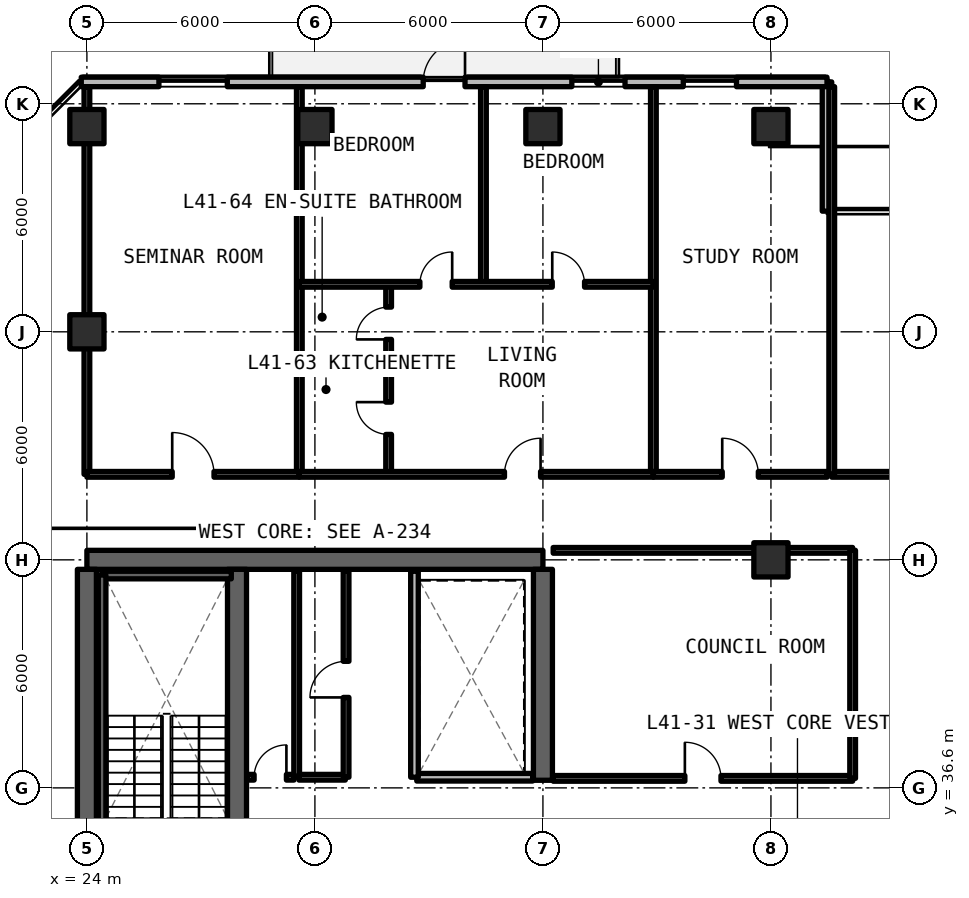
"""IFC4 building model, lengths in metres.
Left out: names, types, materials, properties, quantities, classifications, styles, units other than length and angle.
Written with IfcOpenShell. Run it as: python <this file> out.ifc"""

import sys

from ifc_helpers import new_model, si_unit, direction, frame, frame_2d, origin, origin_2d, place, context, subcontext, project, spatial, rectangle, extrude, element, fill, save


model = new_model("IFC4")
c1 = context("Model", 3, precision=1e-05, world=origin(), true_north=direction((0.0, 1.0)))
c2 = subcontext(c1, "Body", "Model", "MODEL_VIEW")
j1 = project(units=[si_unit("LENGTHUNIT", "METRE"), si_unit("PLANEANGLEUNIT", "RADIAN")], contexts=[c1])
p1 = place(None, origin())
s1 = spatial("IfcSite", under=j1, at=p1, CompositionType="ELEMENT")
p2 = place(p1, origin())
s2 = spatial("IfcBuilding", under=s1, at=p2, CompositionType="ELEMENT")
p3 = place(p2, frame((0.0, 0.0, 148.5)))
s3 = spatial("IfcBuildingStorey", under=s2, at=p3, CompositionType="ELEMENT", Elevation=148.5)
p4 = place(p3, frame((36.0, 42.6, 0.0), z_axis=(0.0, 0.0, 1.0), x_axis=(-1.0, 0.0, 0.0)))
e1 = element("IfcWall", 1, at=p4, inside=s3, PredefinedType="SHEAR", context=c2, shape_type="SweptSolid", body=[
    extrude(rectangle(XDim=12.0, YDim=0.5, at=frame_2d((6.0, 0.0))), origin(), (0.0, 0.0, 1.0), 3.3),
])
p5 = place(p3, frame((24.0, 24.85, 0.0), z_axis=(0.0, 0.0, 1.0), x_axis=(0.0, 1.0, 0.0)))
e2 = element("IfcWall", 2, at=p5, inside=s3, PredefinedType="SHEAR", context=c2, shape_type="SweptSolid", body=[
    extrude(rectangle(XDim=17.5, YDim=0.5, at=frame_2d((8.75, 0.0))), origin(), (0.0, 0.0, 1.0), 3.3),
])
p6 = place(p3, frame((36.0, 36.8, 0.0), z_axis=(0.0, 0.0, 1.0), x_axis=(0.0, 1.0, 0.0)))
e3 = element("IfcWall", 3, at=p6, inside=s3, PredefinedType="SHEAR", context=c2, shape_type="SweptSolid", body=[
    extrude(rectangle(XDim=5.55, YDim=0.5, at=frame_2d((2.775, 0.0))), origin(), (0.0, 0.0, 1.0), 3.3),
])
p7 = place(p3, frame((27.95, 24.85, 0.0), z_axis=(0.0, 0.0, 1.0), x_axis=(0.0, 1.0, 0.0)))
e4 = element("IfcWall", 4, at=p7, inside=s3, PredefinedType="SHEAR", context=c2, shape_type="SweptSolid", body=[
    extrude(rectangle(XDim=17.5, YDim=0.5, at=frame_2d((8.75, 0.0))), origin(), (0.0, 0.0, 1.0), 3.3),
])
p8 = place(p7, frame((0.4, 0.0, 0.0)))
e5 = element("IfcOpeningElement", 5, at=p8, cuts=e4, PredefinedType="OPENING", context=c2, shape_type="SweptSolid", body=[
    extrude(rectangle(XDim=1.15, YDim=2.15, at=frame_2d((0.575, 1.075))), frame((0.0, 0.26, 0.0), z_axis=(0.0, -1.0, 0.0), x_axis=(1.0, 0.0, 0.0)), (0.0, 0.0, 1.0), 0.52),
])
p9 = place(p7, frame((9.6, 0.0, 0.0)))
e6 = element("IfcOpeningElement", 6, at=p9, cuts=e4, PredefinedType="OPENING", context=c2, shape_type="SweptSolid", body=[
    extrude(rectangle(XDim=1.15, YDim=2.15, at=frame_2d((0.575, 1.075))), frame((0.0, 0.26, 0.0), z_axis=(0.0, -1.0, 0.0), x_axis=(1.0, 0.0, 0.0)), (0.0, 0.0, 1.0), 0.52),
])
for number, where, z_axis, x_axis in (
    (7, (42.0, 42.6, 0.0), (0.0, 0.0, 1.0), (1.0, 0.0, 0.0)),
    (8, (24.0, 48.6, 0.0), (0.0, 0.0, 1.0), (1.0, 0.0, 0.0)),
    (9, (24.0, 54.0, 0.0), (0.0, 0.0, 1.0), (1.0, 0.0, 0.0)),
    (10, (30.0, 54.0, 0.0), (0.0, 0.0, 1.0), (1.0, 0.0, 0.0)),
    (11, (36.0, 54.0, 0.0), (0.0, 0.0, 1.0), (1.0, 0.0, 0.0)),
    (12, (42.0, 54.0, 0.0), (0.0, 0.0, 1.0), (1.0, 0.0, 0.0)),
):
    element("IfcColumn", number, at=place(p3, frame(where, z_axis=z_axis, x_axis=x_axis)), inside=s3, PredefinedType="COLUMN", context=c2, shape_type="SweptSolid", body=[
        extrude(rectangle(XDim=0.9, YDim=0.9, at=origin_2d()), origin(), (0.0, 0.0, 1.0), 3.3),
    ])
p10 = place(p3, frame((43.475, 51.775, 0.0), z_axis=(0.0, 0.0, 1.0), x_axis=(0.0, 1.0, 0.0)))
e13 = element("IfcWall", 13, at=p10, inside=s3, PredefinedType="SOLIDWALL", context=c2, shape_type="SweptSolid", body=[
    extrude(rectangle(XDim=3.4, YDim=0.25, at=frame_2d((1.7, 0.0))), origin(), (0.0, 0.0, 1.0), 3.08),
])
p11 = place(p3, frame((43.475, 55.175, 0.0), z_axis=(0.0, 0.0, 1.0), x_axis=(-1.0, 0.0, 0.0)))
e14 = element("IfcWall", 14, at=p11, inside=s3, PredefinedType="SOLIDWALL", context=c2, shape_type="SweptSolid", body=[
    extrude(rectangle(XDim=19.623, YDim=0.25, at=frame_2d((9.812, 0.0))), origin(), (0.0, 0.0, 1.0), 3.08),
])
p12 = place(p11, frame((9.525, 0.0, 0.0)))
e15 = element("IfcOpeningElement", 15, at=p12, cuts=e14, PredefinedType="OPENING", context=c2, shape_type="SweptSolid", body=[
    extrude(rectangle(XDim=1.1, YDim=2.15, at=frame_2d((0.55, 1.075))), frame((0.0, 0.135, 0.0), z_axis=(0.0, -1.0, 0.0), x_axis=(1.0, 0.0, 0.0)), (0.0, 0.0, 1.0), 0.27),
])
p13 = place(p11, frame((15.78, 0.0, 0.78)))
e16 = element("IfcOpeningElement", 16, at=p13, cuts=e14, PredefinedType="OPENING", context=c2, shape_type="SweptSolid", body=[
    extrude(rectangle(XDim=1.8, YDim=1.66, at=frame_2d((0.9, 0.83))), frame((0.0, 0.135, 0.0), z_axis=(0.0, -1.0, 0.0), x_axis=(1.0, 0.0, 0.0)), (0.0, 0.0, 1.0), 0.27),
])
p14 = place(p11, frame((5.315, 0.0, 0.78)))
e17 = element("IfcOpeningElement", 17, at=p14, cuts=e14, PredefinedType="OPENING", context=c2, shape_type="SweptSolid", body=[
    extrude(rectangle(XDim=1.4, YDim=1.65, at=frame_2d((0.7, 0.825))), frame((0.0, 0.135, 0.0), z_axis=(0.0, -1.0, 0.0), x_axis=(1.0, 0.0, 0.0)), (0.0, 0.0, 1.0), 0.27),
])
p15 = place(p11, frame((2.382, 0.0, 0.78)))
e18 = element("IfcOpeningElement", 18, at=p15, cuts=e14, PredefinedType="OPENING", context=c2, shape_type="SweptSolid", body=[
    extrude(rectangle(XDim=1.4, YDim=1.65, at=frame_2d((0.7, 0.825))), frame((0.0, 0.135, 0.0), z_axis=(0.0, -1.0, 0.0), x_axis=(1.0, 0.0, 0.0)), (0.0, 0.0, 1.0), 0.27),
])
p16 = place(p3, frame((29.52, 36.88, 0.0), z_axis=(0.0, 0.0, 1.0), x_axis=(0.0, 1.0, 0.0)))
e19 = element("IfcWall", 19, at=p16, inside=s3, PredefinedType="SOLIDWALL", context=c2, shape_type="SweptSolid", body=[
    extrude(rectangle(XDim=5.42, YDim=0.15, at=frame_2d((2.71, 0.0))), origin(), (0.0, 0.0, 1.0), 2.35),
])
p17 = place(p3, frame((28.22, 36.88, 0.0), z_axis=(0.0, 0.0, 1.0), x_axis=(1.0, 0.0, 0.0)))
e20 = element("IfcWall", 20, at=p17, inside=s3, PredefinedType="SOLIDWALL", context=c2, shape_type="SweptSolid", body=[
    extrude(rectangle(XDim=1.23, YDim=0.15, at=frame_2d((0.615, 0.0))), origin(), (0.0, 0.0, 1.0), 2.35),
])
p18 = place(p17, frame((0.18, 0.0, 0.0)))
e21 = element("IfcOpeningElement", 21, at=p18, cuts=e20, PredefinedType="OPENING", context=c2, shape_type="SweptSolid", body=[
    extrude(rectangle(XDim=0.85, YDim=2.1, at=frame_2d((0.425, 1.05))), frame((0.0, 0.085, 0.0), z_axis=(0.0, -1.0, 0.0), x_axis=(1.0, 0.0, 0.0)), (0.0, 0.0, 1.0), 0.17),
])
p19 = place(p3, frame((29.58, 36.88, 0.0), z_axis=(0.0, 0.0, 1.0), x_axis=(1.0, 0.0, 0.0)))
e22 = element("IfcWall", 22, at=p19, inside=s3, PredefinedType="SOLIDWALL", context=c2, shape_type="SweptSolid", body=[
    extrude(rectangle(XDim=1.22, YDim=0.15, at=frame_2d((0.61, 0.0))), origin(), (0.0, 0.0, 1.0), 2.35),
])
p20 = place(p3, frame((30.82, 36.88, 0.0), z_axis=(0.0, 0.0, 1.0), x_axis=(0.0, 1.0, 0.0)))
e23 = element("IfcWall", 23, at=p20, inside=s3, PredefinedType="SOLIDWALL", context=c2, shape_type="SweptSolid", body=[
    extrude(rectangle(XDim=5.42, YDim=0.15, at=frame_2d((2.71, 0.0))), origin(), (0.0, 0.0, 1.0), 2.35),
])
p21 = place(p20, frame((2.1, 0.0, 0.0)))
e24 = element("IfcOpeningElement", 24, at=p21, cuts=e23, PredefinedType="OPENING", context=c2, shape_type="SweptSolid", body=[
    extrude(rectangle(XDim=0.95, YDim=2.15, at=frame_2d((0.475, 1.075))), frame((0.0, 0.085, 0.0), z_axis=(0.0, -1.0, 0.0), x_axis=(1.0, 0.0, 0.0)), (0.0, 0.0, 1.0), 0.17),
])
p22 = place(p3, frame((32.68, 36.88, 0.0), z_axis=(0.0, 0.0, 1.0), x_axis=(1.0, 0.0, 0.0)))
e25 = element("IfcWall", 25, at=p22, inside=s3, PredefinedType="SOLIDWALL", context=c2, shape_type="SweptSolid", body=[
    extrude(rectangle(XDim=3.05, YDim=0.2, at=frame_2d((1.525, 0.0))), origin(), (0.0, 0.0, 1.0), 2.35),
])
p23 = place(p3, frame((32.62, 36.88, 0.0), z_axis=(0.0, 0.0, 1.0), x_axis=(0.0, 1.0, 0.0)))
e26 = element("IfcWall", 26, at=p23, inside=s3, PredefinedType="SOLIDWALL", context=c2, shape_type="SweptSolid", body=[
    extrude(rectangle(XDim=5.42, YDim=0.2, at=frame_2d((2.71, 0.0))), origin(), (0.0, 0.0, 1.0), 2.35),
])
p24 = place(p3, frame((36.27, 36.85, 0.0), z_axis=(0.0, 0.0, 1.0), x_axis=(1.0, 0.0, 0.0)))
e27 = element("IfcWall", 27, at=p24, inside=s3, PredefinedType="SOLIDWALL", context=c2, shape_type="SweptSolid", body=[
    extrude(rectangle(XDim=7.88, YDim=0.15, at=frame_2d((3.94, 0.0))), origin(), (0.0, 0.0, 1.0), 2.35),
])
p25 = place(p24, frame((3.465, 0.0, 0.0)))
e28 = element("IfcOpeningElement", 28, at=p25, cuts=e27, PredefinedType="OPENING", context=c2, shape_type="SweptSolid", body=[
    extrude(rectangle(XDim=0.95, YDim=2.15, at=frame_2d((0.475, 1.075))), frame((0.0, 0.085, 0.0), z_axis=(0.0, -1.0, 0.0), x_axis=(1.0, 0.0, 0.0)), (0.0, 0.0, 1.0), 0.17),
])
p26 = place(p3, frame((36.27, 42.85, 0.0), z_axis=(0.0, 0.0, 1.0), x_axis=(1.0, 0.0, 0.0)))
e29 = element("IfcWall", 29, at=p26, inside=s3, PredefinedType="SOLIDWALL", context=c2, shape_type="SweptSolid", body=[
    extrude(rectangle(XDim=7.88, YDim=0.15, at=frame_2d((3.94, 0.0))), origin(), (0.0, 0.0, 1.0), 2.35),
])
p27 = place(p3, frame((44.15, 36.85, 0.0), z_axis=(0.0, 0.0, 1.0), x_axis=(0.0, 1.0, 0.0)))
e30 = element("IfcWall", 30, at=p27, inside=s3, PredefinedType="SOLIDWALL", context=c2, shape_type="SweptSolid", body=[
    extrude(rectangle(XDim=6.0, YDim=0.15, at=frame_2d((3.0, 0.0))), origin(), (0.0, 0.0, 1.0), 2.35),
])
p28 = place(p3, frame((43.6, 44.85, 0.0), z_axis=(0.0, 0.0, 1.0), x_axis=(1.0, 0.0, 0.0)))
e31 = element("IfcWall", 31, at=p28, inside=s3, PredefinedType="SOLIDWALL", context=c2, shape_type="SweptSolid", body=[
    extrude(rectangle(XDim=8.4, YDim=0.15, at=frame_2d((4.2, 0.0))), origin(), (0.0, 0.0, 1.0), 2.35),
])
p29 = place(p28, frame((3.65, 0.0, 0.0)))
e32 = element("IfcOpeningElement", 32, at=p29, cuts=e31, PredefinedType="OPENING", context=c2, shape_type="SweptSolid", body=[
    extrude(rectangle(XDim=1.1, YDim=2.15, at=frame_2d((0.55, 1.075))), frame((0.0, 0.085, 0.0), z_axis=(0.0, -1.0, 0.0), x_axis=(1.0, 0.0, 0.0)), (0.0, 0.0, 1.0), 0.17),
])
for number, where, z_axis, x_axis in (
    (33, (43.6, 44.85, 0.0), (0.0, 0.0, 1.0), (0.0, 1.0, 0.0)),
    (34, (24.0, 44.85, 0.0), (0.0, 0.0, 1.0), (0.0, 1.0, 0.0)),
    (35, (29.59, 44.85, 0.0), (0.0, 0.0, 1.0), (0.0, 1.0, 0.0)),
):
    element("IfcWall", number, at=place(p3, frame(where, z_axis=z_axis, x_axis=x_axis)), inside=s3, PredefinedType="SOLIDWALL", context=c2, shape_type="SweptSolid", body=[
        extrude(rectangle(XDim=10.2, YDim=0.15, at=frame_2d((5.1, 0.0))), origin(), (0.0, 0.0, 1.0), 2.35),
    ])
p30 = place(p3, frame((24.0, 44.85, 0.0), z_axis=(0.0, 0.0, 1.0), x_axis=(1.0, 0.0, 0.0)))
e36 = element("IfcWall", 36, at=p30, inside=s3, PredefinedType="SOLIDWALL", context=c2, shape_type="SweptSolid", body=[
    extrude(rectangle(XDim=5.59, YDim=0.15, at=frame_2d((2.795, 0.0))), origin(), (0.0, 0.0, 1.0), 2.35),
])
p31 = place(p30, frame((2.245, 0.0, 0.0)))
e37 = element("IfcOpeningElement", 37, at=p31, cuts=e36, PredefinedType="OPENING", context=c2, shape_type="SweptSolid", body=[
    extrude(rectangle(XDim=1.1, YDim=2.15, at=frame_2d((0.55, 1.075))), frame((0.0, 0.085, 0.0), z_axis=(0.0, -1.0, 0.0), x_axis=(1.0, 0.0, 0.0)), (0.0, 0.0, 1.0), 0.17),
])
p32 = place(p3, frame((38.906, 44.85, 0.0), z_axis=(0.0, 0.0, 1.0), x_axis=(0.0, 1.0, 0.0)))
e38 = element("IfcWall", 38, at=p32, inside=s3, PredefinedType="SOLIDWALL", context=c2, shape_type="SweptSolid", body=[
    extrude(rectangle(XDim=10.2, YDim=0.15, at=frame_2d((5.1, 0.0))), origin(), (0.0, 0.0, 1.0), 2.35),
])
p33 = place(p3, frame((29.59, 47.8, 0.0), z_axis=(0.0, 0.0, 1.0), x_axis=(1.0, 0.0, 0.0)))
e39 = element("IfcWall", 39, at=p33, inside=s3, PredefinedType="PARTITIONING", context=c2, shape_type="SweptSolid", body=[
    extrude(rectangle(XDim=2.35, YDim=0.15, at=frame_2d((1.175, 0.0))), origin(), (0.0, 0.0, 1.0), 2.35),
])
p34 = place(p3, frame((31.94, 44.85, 0.0), z_axis=(0.0, 0.0, 1.0), x_axis=(0.0, 1.0, 0.0)))
e40 = element("IfcWall", 40, at=p34, inside=s3, PredefinedType="PARTITIONING", context=c2, shape_type="SweptSolid", body=[
    extrude(rectangle(XDim=5.0, YDim=0.15, at=frame_2d((2.5, 0.0))), origin(), (0.0, 0.0, 1.0), 2.35),
])
p35 = place(p34, frame((1.05, 0.0, 0.0)))
e41 = element("IfcOpeningElement", 41, at=p35, cuts=e40, PredefinedType="OPENING", context=c2, shape_type="SweptSolid", body=[
    extrude(rectangle(XDim=0.85, YDim=2.1, at=frame_2d((0.425, 1.05))), frame((0.0, 0.085, 0.0), z_axis=(0.0, -1.0, 0.0), x_axis=(1.0, 0.0, 0.0)), (0.0, 0.0, 1.0), 0.17),
])
p36 = place(p34, frame((3.55, 0.0, 0.0)))
e42 = element("IfcOpeningElement", 42, at=p36, cuts=e40, PredefinedType="OPENING", context=c2, shape_type="SweptSolid", body=[
    extrude(rectangle(XDim=0.85, YDim=2.1, at=frame_2d((0.425, 1.05))), frame((0.0, 0.085, 0.0), z_axis=(0.0, -1.0, 0.0), x_axis=(1.0, 0.0, 0.0)), (0.0, 0.0, 1.0), 0.17),
])
p37 = place(p3, frame((34.435, 49.85, 0.0), z_axis=(0.0, 0.0, 1.0), x_axis=(0.0, 1.0, 0.0)))
e43 = element("IfcWall", 43, at=p37, inside=s3, PredefinedType="PARTITIONING", context=c2, shape_type="SweptSolid", body=[
    extrude(rectangle(XDim=5.2, YDim=0.15, at=frame_2d((2.6, 0.0))), origin(), (0.0, 0.0, 1.0), 2.35),
])
p38 = place(p3, frame((29.59, 49.85, 0.0), z_axis=(0.0, 0.0, 1.0), x_axis=(1.0, 0.0, 0.0)))
e44 = element("IfcWall", 44, at=p38, inside=s3, PredefinedType="PARTITIONING", context=c2, shape_type="SweptSolid", body=[
    extrude(rectangle(XDim=9.317, YDim=0.15, at=frame_2d((4.658, 0.0))), origin(), (0.0, 0.0, 1.0), 2.35),
])
p39 = place(p38, frame((3.172, 0.0, 0.0)))
e45 = element("IfcOpeningElement", 45, at=p39, cuts=e44, PredefinedType="OPENING", context=c2, shape_type="SweptSolid", body=[
    extrude(rectangle(XDim=0.85, YDim=2.1, at=frame_2d((0.425, 1.05))), frame((0.0, 0.085, 0.0), z_axis=(0.0, -1.0, 0.0), x_axis=(1.0, 0.0, 0.0)), (0.0, 0.0, 1.0), 0.17),
])
p40 = place(p38, frame((6.656, 0.0, 0.0)))
e46 = element("IfcOpeningElement", 46, at=p40, cuts=e44, PredefinedType="OPENING", context=c2, shape_type="SweptSolid", body=[
    extrude(rectangle(XDim=0.85, YDim=2.1, at=frame_2d((0.425, 1.05))), frame((0.0, 0.085, 0.0), z_axis=(0.0, -1.0, 0.0), x_axis=(1.0, 0.0, 0.0)), (0.0, 0.0, 1.0), 0.17),
])
p41 = place(p3, frame((29.59, 44.85, 0.0), z_axis=(0.0, 0.0, 1.0), x_axis=(1.0, 0.0, 0.0)))
e47 = element("IfcWall", 47, at=p41, inside=s3, PredefinedType="SOLIDWALL", context=c2, shape_type="SweptSolid", body=[
    extrude(rectangle(XDim=9.317, YDim=0.15, at=frame_2d((4.658, 0.0))), origin(), (0.0, 0.0, 1.0), 2.35),
])
p42 = place(p41, frame((5.398, 0.0, 0.0)))
e48 = element("IfcOpeningElement", 48, at=p42, cuts=e47, PredefinedType="OPENING", context=c2, shape_type="SweptSolid", body=[
    extrude(rectangle(XDim=0.95, YDim=2.15, at=frame_2d((0.475, 1.075))), frame((0.0, 0.085, 0.0), z_axis=(0.0, -1.0, 0.0), x_axis=(1.0, 0.0, 0.0)), (0.0, 0.0, 1.0), 0.17),
])
p43 = place(p3, frame((38.906, 44.85, 0.0), z_axis=(0.0, 0.0, 1.0), x_axis=(1.0, 0.0, 0.0)))
e49 = element("IfcWall", 49, at=p43, inside=s3, PredefinedType="SOLIDWALL", context=c2, shape_type="SweptSolid", body=[
    extrude(rectangle(XDim=4.573, YDim=0.15, at=frame_2d((2.287, 0.0))), origin(), (0.0, 0.0, 1.0), 2.35),
])
p44 = place(p43, frame((1.812, 0.0, 0.0)))
e50 = element("IfcOpeningElement", 50, at=p44, cuts=e49, PredefinedType="OPENING", context=c2, shape_type="SweptSolid", body=[
    extrude(rectangle(XDim=0.95, YDim=2.15, at=frame_2d((0.475, 1.075))), frame((0.0, 0.085, 0.0), z_axis=(0.0, -1.0, 0.0), x_axis=(1.0, 0.0, 0.0)), (0.0, 0.0, 1.0), 0.17),
])
p45 = place(p3, frame((27.8, 42.2, 0.0), z_axis=(0.0, 0.0, 1.0), x_axis=(-1.0, 0.0, 0.0)))
e51 = element("IfcWall", 51, at=p45, inside=s3, PredefinedType="SOLIDWALL", context=c2, shape_type="SweptSolid", body=[
    extrude(rectangle(XDim=3.4, YDim=0.2, at=frame_2d((1.7, 0.0))), origin(), (0.0, 0.0, 1.0), 3.3),
])
p46 = place(p3, frame((24.4, 42.2, 0.0), z_axis=(0.0, 0.0, 1.0), x_axis=(0.0, -1.0, 0.0)))
e52 = element("IfcWall", 52, at=p46, inside=s3, PredefinedType="SOLIDWALL", context=c2, shape_type="SweptSolid", body=[
    extrude(rectangle(XDim=8.0, YDim=0.2, at=frame_2d((4.0, 0.0))), origin(), (0.0, 0.0, 1.0), 3.3),
])
p47 = place(p12, frame((1.1, 0.0, 0.0), z_axis=(0.0, 0.0, 1.0), x_axis=(-1.0, 0.0, 0.0)))
e53 = element("IfcDoor", 53, at=p47, inside=s3, OperationType="SINGLE_SWING_LEFT", PredefinedType="DOOR", context=c2, shape_type="SweptSolid", body=[
    extrude(rectangle(XDim=1.1, YDim=2.15, at=frame_2d((0.55, 1.075))), frame((0.0, 0.025, 0.0), z_axis=(0.0, -1.0, 0.0), x_axis=(1.0, 0.0, 0.0)), (0.0, 0.0, 1.0), 0.05),
])
fill(e15, e53)
p48 = place(p13, origin())
e54 = element("IfcWindow", 54, at=p48, inside=s3, PartitioningType="SINGLE_PANEL", PredefinedType="WINDOW", context=c2, shape_type="SweptSolid", body=[
    extrude(rectangle(XDim=1.8, YDim=1.66, at=frame_2d((0.9, 0.83))), frame((0.0, 0.03, 0.0), z_axis=(0.0, -1.0, 0.0), x_axis=(1.0, 0.0, 0.0)), (0.0, 0.0, 1.0), 0.06),
])
fill(e16, e54)
p49 = place(p14, origin())
e55 = element("IfcWindow", 55, at=p49, inside=s3, PartitioningType="SINGLE_PANEL", PredefinedType="WINDOW", context=c2, shape_type="SweptSolid", body=[
    extrude(rectangle(XDim=1.4, YDim=1.65, at=frame_2d((0.7, 0.825))), frame((0.0, 0.03, 0.0), z_axis=(0.0, -1.0, 0.0), x_axis=(1.0, 0.0, 0.0)), (0.0, 0.0, 1.0), 0.06),
])
fill(e17, e55)
p50 = place(p15, origin())
e56 = element("IfcWindow", 56, at=p50, inside=s3, PartitioningType="SINGLE_PANEL", PredefinedType="WINDOW", context=c2, shape_type="SweptSolid", body=[
    extrude(rectangle(XDim=1.4, YDim=1.65, at=frame_2d((0.7, 0.825))), frame((0.0, 0.03, 0.0), z_axis=(0.0, -1.0, 0.0), x_axis=(1.0, 0.0, 0.0)), (0.0, 0.0, 1.0), 0.06),
])
fill(e18, e56)
p51 = place(p18, origin())
e57 = element("IfcDoor", 57, at=p51, inside=s3, OperationType="SINGLE_SWING_RIGHT", PredefinedType="DOOR", context=c2, shape_type="SweptSolid", body=[
    extrude(rectangle(XDim=0.85, YDim=2.1, at=frame_2d((0.425, 1.05))), frame((0.0, 0.025, 0.0), z_axis=(0.0, -1.0, 0.0), x_axis=(1.0, 0.0, 0.0)), (0.0, 0.0, 1.0), 0.05),
])
fill(e21, e57)
p52 = place(p21, origin())
e58 = element("IfcDoor", 58, at=p52, inside=s3, OperationType="SINGLE_SWING_LEFT", PredefinedType="DOOR", context=c2, shape_type="SweptSolid", body=[
    extrude(rectangle(XDim=0.95, YDim=2.15, at=frame_2d((0.475, 1.075))), frame((0.0, 0.025, 0.0), z_axis=(0.0, -1.0, 0.0), x_axis=(1.0, 0.0, 0.0)), (0.0, 0.0, 1.0), 0.05),
])
fill(e24, e58)
p53 = place(p25, origin())
e59 = element("IfcDoor", 59, at=p53, inside=s3, OperationType="SINGLE_SWING_LEFT", PredefinedType="DOOR", context=c2, shape_type="SweptSolid", body=[
    extrude(rectangle(XDim=0.95, YDim=2.15, at=frame_2d((0.475, 1.075))), frame((0.0, 0.025, 0.0), z_axis=(0.0, -1.0, 0.0), x_axis=(1.0, 0.0, 0.0)), (0.0, 0.0, 1.0), 0.05),
])
fill(e28, e59)
p54 = place(p31, origin())
e60 = element("IfcDoor", 60, at=p54, inside=s3, OperationType="SINGLE_SWING_LEFT", PredefinedType="DOOR", context=c2, shape_type="SweptSolid", body=[
    extrude(rectangle(XDim=1.1, YDim=2.15, at=frame_2d((0.55, 1.075))), frame((0.0, 0.025, 0.0), z_axis=(0.0, -1.0, 0.0), x_axis=(1.0, 0.0, 0.0)), (0.0, 0.0, 1.0), 0.05),
])
fill(e37, e60)
p55 = place(p35, origin())
e61 = element("IfcDoor", 61, at=p55, inside=s3, OperationType="SINGLE_SWING_RIGHT", PredefinedType="DOOR", context=c2, shape_type="SweptSolid", body=[
    extrude(rectangle(XDim=0.85, YDim=2.1, at=frame_2d((0.425, 1.05))), frame((0.0, 0.025, 0.0), z_axis=(0.0, -1.0, 0.0), x_axis=(1.0, 0.0, 0.0)), (0.0, 0.0, 1.0), 0.05),
])
fill(e41, e61)
p56 = place(p36, origin())
e62 = element("IfcDoor", 62, at=p56, inside=s3, OperationType="SINGLE_SWING_LEFT", PredefinedType="DOOR", context=c2, shape_type="SweptSolid", body=[
    extrude(rectangle(XDim=0.85, YDim=2.1, at=frame_2d((0.425, 1.05))), frame((0.0, 0.025, 0.0), z_axis=(0.0, -1.0, 0.0), x_axis=(1.0, 0.0, 0.0)), (0.0, 0.0, 1.0), 0.05),
])
fill(e42, e62)
p57 = place(p39, origin())
e63 = element("IfcDoor", 63, at=p57, inside=s3, OperationType="SINGLE_SWING_RIGHT", PredefinedType="DOOR", context=c2, shape_type="SweptSolid", body=[
    extrude(rectangle(XDim=0.85, YDim=2.1, at=frame_2d((0.425, 1.05))), frame((0.0, 0.025, 0.0), z_axis=(0.0, -1.0, 0.0), x_axis=(1.0, 0.0, 0.0)), (0.0, 0.0, 1.0), 0.05),
])
fill(e45, e63)
p58 = place(p40, origin())
e64 = element("IfcDoor", 64, at=p58, inside=s3, OperationType="SINGLE_SWING_LEFT", PredefinedType="DOOR", context=c2, shape_type="SweptSolid", body=[
    extrude(rectangle(XDim=0.85, YDim=2.1, at=frame_2d((0.425, 1.05))), frame((0.0, 0.025, 0.0), z_axis=(0.0, -1.0, 0.0), x_axis=(1.0, 0.0, 0.0)), (0.0, 0.0, 1.0), 0.05),
])
fill(e46, e64)
p59 = place(p42, origin())
e65 = element("IfcDoor", 65, at=p59, inside=s3, OperationType="SINGLE_SWING_RIGHT", PredefinedType="DOOR", context=c2, shape_type="SweptSolid", body=[
    extrude(rectangle(XDim=0.95, YDim=2.15, at=frame_2d((0.475, 1.075))), frame((0.0, 0.025, 0.0), z_axis=(0.0, -1.0, 0.0), x_axis=(1.0, 0.0, 0.0)), (0.0, 0.0, 1.0), 0.05),
])
fill(e48, e65)
p60 = place(p44, origin())
e66 = element("IfcDoor", 66, at=p60, inside=s3, OperationType="SINGLE_SWING_LEFT", PredefinedType="DOOR", context=c2, shape_type="SweptSolid", body=[
    extrude(rectangle(XDim=0.95, YDim=2.15, at=frame_2d((0.475, 1.075))), frame((0.0, 0.025, 0.0), z_axis=(0.0, -1.0, 0.0), x_axis=(1.0, 0.0, 0.0)), (0.0, 0.0, 1.0), 0.05),
])
fill(e50, e66)
save(model, sys.argv[1])
